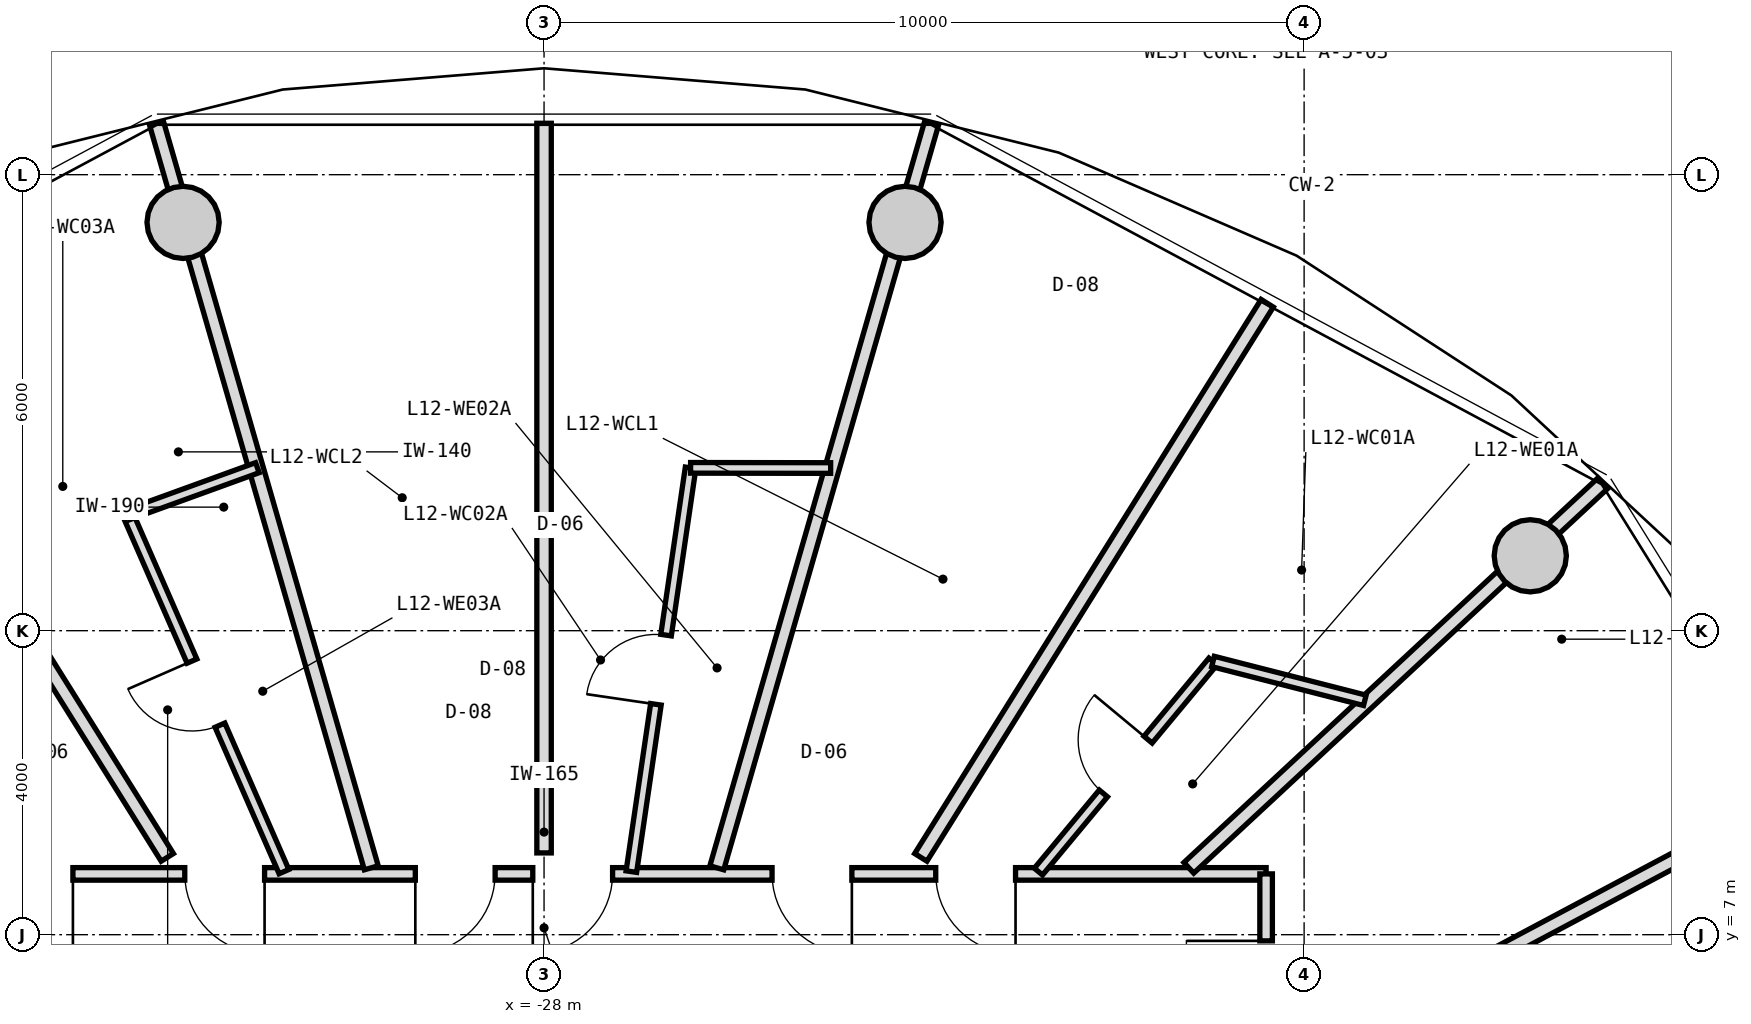
"""IFC4 building model, lengths in metres.
Left out: names, types, materials, properties, quantities, classifications, styles, units other than length and angle.
Written with IfcOpenShell. Run it as: python <this file> out.ifc"""

import sys

from ifc_helpers import new_model, si_unit, direction, frame, frame_2d, origin, origin_2d, place, context, subcontext, project, spatial, rectangle, circle, extrude, source, transform, mapped, element, fill, save


model = new_model("IFC4")
c1 = context("Model", 3, precision=1e-05, world=origin(), true_north=direction((0.0, 1.0)))
c2 = subcontext(c1, "Body", "Model", "MODEL_VIEW")
j1 = project(units=[si_unit("LENGTHUNIT", "METRE"), si_unit("PLANEANGLEUNIT", "RADIAN")], contexts=[c1])
p1 = place(None, origin())
s1 = spatial("IfcSite", under=j1, at=p1, CompositionType="ELEMENT")
p2 = place(p1, origin())
s2 = spatial("IfcBuilding", under=s1, at=p2, CompositionType="ELEMENT")
p3 = place(p2, frame((0.0, 0.0, 42.95)))
s3 = spatial("IfcBuildingStorey", under=s2, at=p3, CompositionType="ELEMENT", Elevation=42.95)
m1 = source(origin(), c2, "Body", "SweptSolid", [
    extrude(circle(Radius=0.475, at=origin_2d()), origin(), (0.0, 0.0, 1.0), 3.05),
])
for number, where, z_axis, x_axis in (
    (1, (-15.025, 11.985, 0.0), (0.0, 0.0, 1.0), (1.0, 0.0, 0.0)),
    (2, (-23.251, 16.373, 0.0), (0.0, 0.0, 1.0), (1.0, 0.0, 0.0)),
    (3, (-32.749, 16.373, 0.0), (0.0, 0.0, 1.0), (1.0, 0.0, 0.0)),
):
    element("IfcColumn", number, at=place(p3, frame(where, z_axis=z_axis, x_axis=x_axis)), inside=s3, PredefinedType="COLUMN", context=c2, shape_type="MappedRepresentation", body=[
        mapped(m1, transform((0.0, 0.0, 0.0), x_axis=(1.0, 0.0, 0.0), y_axis=(0.0, 1.0, 0.0), z_axis=(0.0, 0.0, 1.0), scale=1.0)),
    ])
m2 = source(origin(), c2, "Body", "SweptSolid", [
    extrude(rectangle(XDim=19.0, YDim=0.165, at=frame_2d((9.5, 0.0))), origin(), (0.0, 0.0, 1.0), 2.775),
])
p4 = place(p3, frame((-37.5, 7.8, 0.0), z_axis=(0.0, 0.0, 1.0), x_axis=(1.0, 0.0, 0.0)))
e4 = element("IfcWall", 4, at=p4, inside=s3, PredefinedType="PARTITIONING", context=c2, shape_type="MappedRepresentation", body=[
    mapped(m2, transform((0.0, 0.0, 0.0), x_axis=(1.0, 0.0, 0.0), y_axis=(0.0, 1.0, 0.0), z_axis=(0.0, 0.0, 1.0), scale=1.0)),
])
p5 = place(p4, frame((4.773, 0.0, 0.0)))
e5 = element("IfcOpeningElement", 5, at=p5, cuts=e4, PredefinedType="OPENING", context=c2, shape_type="SweptSolid", body=[
    extrude(rectangle(XDim=1.05, YDim=2.15, at=frame_2d((0.525, 1.075))), frame((0.0, 0.093, 0.0), z_axis=(0.0, -1.0, 0.0), x_axis=(1.0, 0.0, 0.0)), (0.0, 0.0, 1.0), 0.185),
])
p6 = place(p4, frame((2.251, 0.0, 0.0)))
e6 = element("IfcOpeningElement", 6, at=p6, cuts=e4, PredefinedType="OPENING", context=c2, shape_type="SweptSolid", body=[
    extrude(rectangle(XDim=1.05, YDim=2.15, at=frame_2d((0.525, 1.075))), frame((0.0, 0.093, 0.0), z_axis=(0.0, -1.0, 0.0), x_axis=(1.0, 0.0, 0.0)), (0.0, 0.0, 1.0), 0.185),
])
p7 = place(p4, frame((14.653, 0.0, 0.0)))
e7 = element("IfcOpeningElement", 7, at=p7, cuts=e4, PredefinedType="OPENING", context=c2, shape_type="SweptSolid", body=[
    extrude(rectangle(XDim=1.05, YDim=2.15, at=frame_2d((0.525, 1.075))), frame((0.0, 0.093, 0.0), z_axis=(0.0, -1.0, 0.0), x_axis=(1.0, 0.0, 0.0)), (0.0, 0.0, 1.0), 0.185),
])
p8 = place(p4, frame((12.5, 0.0, 0.0)))
e8 = element("IfcOpeningElement", 8, at=p8, cuts=e4, PredefinedType="OPENING", context=c2, shape_type="SweptSolid", body=[
    extrude(rectangle(XDim=1.05, YDim=2.15, at=frame_2d((0.525, 1.075))), frame((0.0, 0.093, 0.0), z_axis=(0.0, -1.0, 0.0), x_axis=(1.0, 0.0, 0.0)), (0.0, 0.0, 1.0), 0.185),
])
p9 = place(p4, frame((9.352, 0.0, 0.0)))
e9 = element("IfcOpeningElement", 9, at=p9, cuts=e4, PredefinedType="OPENING", context=c2, shape_type="SweptSolid", body=[
    extrude(rectangle(XDim=1.05, YDim=2.15, at=frame_2d((0.525, 1.075))), frame((0.0, 0.093, 0.0), z_axis=(0.0, -1.0, 0.0), x_axis=(1.0, 0.0, 0.0)), (0.0, 0.0, 1.0), 0.185),
])
p10 = place(p4, frame((7.806, 0.0, 0.0)))
e10 = element("IfcOpeningElement", 10, at=p10, cuts=e4, PredefinedType="OPENING", context=c2, shape_type="SweptSolid", body=[
    extrude(rectangle(XDim=1.05, YDim=2.15, at=frame_2d((0.525, 1.075))), frame((0.0, 0.093, 0.0), z_axis=(0.0, -1.0, 0.0), x_axis=(1.0, 0.0, 0.0)), (0.0, 0.0, 1.0), 0.185),
])
m3 = source(origin(), c2, "Body", "SweptSolid", [
    extrude(rectangle(XDim=15.6, YDim=0.165, at=frame_2d((7.8, 0.0))), origin(), (0.0, 0.0, 1.0), 2.775),
])
p11 = place(p3, frame((-18.5, 7.8, 0.0), z_axis=(0.0, 0.0, 1.0), x_axis=(0.0, -1.0, 0.0)))
e11 = element("IfcWall", 11, at=p11, inside=s3, PredefinedType="PARTITIONING", context=c2, shape_type="MappedRepresentation", body=[
    mapped(m3, transform((0.0, 0.0, 0.0), x_axis=(1.0, 0.0, 0.0), y_axis=(0.0, 1.0, 0.0), z_axis=(0.0, 0.0, 1.0), scale=1.0)),
])
p12 = place(p11, frame((12.141, 0.0, 0.0)))
e12 = element("IfcOpeningElement", 12, at=p12, cuts=e11, PredefinedType="OPENING", context=c2, shape_type="SweptSolid", body=[
    extrude(rectangle(XDim=1.25, YDim=2.2, at=frame_2d((0.625, 1.1))), frame((0.0, 0.093, 0.0), z_axis=(0.0, -1.0, 0.0), x_axis=(1.0, 0.0, 0.0)), (0.0, 0.0, 1.0), 0.185),
])
p13 = place(p11, frame((7.175, 0.0, 0.0)))
e13 = element("IfcOpeningElement", 13, at=p13, cuts=e11, PredefinedType="OPENING", context=c2, shape_type="SweptSolid", body=[
    extrude(rectangle(XDim=1.25, YDim=2.2, at=frame_2d((0.625, 1.1))), frame((0.0, 0.093, 0.0), z_axis=(0.0, -1.0, 0.0), x_axis=(1.0, 0.0, 0.0)), (0.0, 0.0, 1.0), 0.185),
])
p14 = place(p11, frame((2.826, 0.0, 0.0)))
e14 = element("IfcOpeningElement", 14, at=p14, cuts=e11, PredefinedType="OPENING", context=c2, shape_type="SweptSolid", body=[
    extrude(rectangle(XDim=1.05, YDim=2.15, at=frame_2d((0.525, 1.075))), frame((0.0, 0.093, 0.0), z_axis=(0.0, -1.0, 0.0), x_axis=(1.0, 0.0, 0.0)), (0.0, 0.0, 1.0), 0.185),
])
p15 = place(p11, frame((0.881, 0.0, 0.0)))
e15 = element("IfcOpeningElement", 15, at=p15, cuts=e11, PredefinedType="OPENING", context=c2, shape_type="SweptSolid", body=[
    extrude(rectangle(XDim=1.05, YDim=2.15, at=frame_2d((0.525, 1.075))), frame((0.0, 0.093, 0.0), z_axis=(0.0, -1.0, 0.0), x_axis=(1.0, 0.0, 0.0)), (0.0, 0.0, 1.0), 0.185),
])
m4 = source(origin(), c2, "Body", "SweptSolid", [
    extrude(rectangle(XDim=10.196, YDim=0.19, at=frame_2d((5.098, 0.0))), origin(), (0.0, 0.0, 1.0), 2.225),
])
p16 = place(p3, frame((-30.273, 7.88, 0.0), z_axis=(0.0, 0.0, 1.0), x_axis=(-0.277136420347, 0.960830580549, 0.0)))
e16 = element("IfcWall", 16, at=p16, inside=s3, PredefinedType="PARTITIONING", context=c2, shape_type="MappedRepresentation", body=[
    mapped(m4, transform((0.0, 0.0, 0.0), x_axis=(1.0, 0.0, 0.0), y_axis=(0.0, 1.0, 0.0), z_axis=(0.0, 0.0, 1.0), scale=1.0)),
])
m5 = source(origin(), c2, "Body", "SweptSolid", [
    extrude(rectangle(XDim=8.598, YDim=0.19, at=frame_2d((4.299, 0.0))), origin(), (0.0, 0.0, 1.0), 2.775),
])
p17 = place(p3, frame((-32.957, 8.017, 0.0), z_axis=(0.0, 0.0, 1.0), x_axis=(-0.530039776395, 0.847972779893, 0.0)))
e17 = element("IfcWall", 17, at=p17, inside=s3, PredefinedType="PARTITIONING", context=c2, shape_type="MappedRepresentation", body=[
    mapped(m5, transform((0.0, 0.0, 0.0), x_axis=(1.0, 0.0, 0.0), y_axis=(0.0, 1.0, 0.0), z_axis=(0.0, 0.0, 1.0), scale=1.0)),
])
m6 = source(origin(), c2, "Body", "SweptSolid", [
    extrude(rectangle(XDim=5.126, YDim=0.14, at=frame_2d((2.563, 0.0))), origin(), (0.0, 0.0, 1.0), 2.775),
])
p18 = place(p3, frame((-31.422, 7.83, 0.0), z_axis=(0.0, 0.0, 1.0), x_axis=(-0.400473994842, 0.916308124735, 0.0)))
e18 = element("IfcWall", 18, at=p18, inside=s3, PredefinedType="PARTITIONING", context=c2, shape_type="MappedRepresentation", body=[
    mapped(m6, transform((0.0, 0.0, 0.0), x_axis=(1.0, 0.0, 0.0), y_axis=(0.0, 1.0, 0.0), z_axis=(0.0, 0.0, 1.0), scale=1.0)),
])
p19 = place(p18, frame((2.103, 0.0, 0.0)))
e19 = element("IfcOpeningElement", 19, at=p19, cuts=e18, PredefinedType="OPENING", context=c2, shape_type="SweptSolid", body=[
    extrude(rectangle(XDim=0.92, YDim=2.1, at=frame_2d((0.46, 1.05))), frame((0.0, 0.08, 0.0), z_axis=(0.0, -1.0, 0.0), x_axis=(1.0, 0.0, 0.0)), (0.0, 0.0, 1.0), 0.16),
])
m7 = source(origin(), c2, "Body", "SweptSolid", [
    extrude(rectangle(XDim=1.811, YDim=0.14, at=frame_2d((0.906, 0.0))), origin(), (0.0, 0.0, 1.0), 2.775),
])
p20 = place(p3, frame((-33.475, 12.527, 0.0), z_axis=(0.0, 0.0, 1.0), x_axis=(0.940009682452, 0.341147764021, 0.0)))
e20 = element("IfcWall", 20, at=p20, inside=s3, PredefinedType="PARTITIONING", context=c2, shape_type="MappedRepresentation", body=[
    mapped(m7, transform((0.0, 0.0, 0.0), x_axis=(1.0, 0.0, 0.0), y_axis=(0.0, 1.0, 0.0), z_axis=(0.0, 0.0, 1.0), scale=1.0)),
])
m8 = source(origin(), c2, "Body", "SweptSolid", [
    extrude(rectangle(XDim=7.435, YDim=0.19, at=frame_2d((3.717, 0.0))), origin(), (0.0, 0.0, 1.0), 2.225),
])
p21 = place(p3, frame((-19.517, 7.88, 0.0), z_axis=(0.0, 0.0, 1.0), x_axis=(0.732651956848, 0.680603489652, 0.0)))
e21 = element("IfcWall", 21, at=p21, inside=s3, PredefinedType="PARTITIONING", context=c2, shape_type="MappedRepresentation", body=[
    mapped(m8, transform((0.0, 0.0, 0.0), x_axis=(1.0, 0.0, 0.0), y_axis=(0.0, 1.0, 0.0), z_axis=(0.0, 0.0, 1.0), scale=1.0)),
])
m9 = source(origin(), c2, "Body", "SweptSolid", [
    extrude(rectangle(XDim=7.677, YDim=0.19, at=frame_2d((3.838, 0.0))), origin(), (0.0, 0.0, 1.0), 2.775),
])
p22 = place(p3, frame((-18.297, 5.231, 0.0), z_axis=(0.0, 0.0, 1.0), x_axis=(0.882725057546, 0.469889851753, 0.0)))
e22 = element("IfcWall", 22, at=p22, inside=s3, PredefinedType="PARTITIONING", context=c2, shape_type="MappedRepresentation", body=[
    mapped(m9, transform((0.0, 0.0, 0.0), x_axis=(1.0, 0.0, 0.0), y_axis=(0.0, 1.0, 0.0), z_axis=(0.0, 0.0, 1.0), scale=1.0)),
])
p23 = place(p3, frame((-25.727, 7.88, 0.0), z_axis=(0.0, 0.0, 1.0), x_axis=(0.277136420347, 0.960830580549, 0.0)))
e23 = element("IfcWall", 23, at=p23, inside=s3, PredefinedType="PARTITIONING", context=c2, shape_type="MappedRepresentation", body=[
    mapped(m4, transform((0.0, 0.0, 0.0), x_axis=(1.0, 0.0, 0.0), y_axis=(0.0, 1.0, 0.0), z_axis=(0.0, 0.0, 1.0), scale=1.0)),
])
p24 = place(p3, frame((-23.043, 8.017, 0.0), z_axis=(0.0, 0.0, 1.0), x_axis=(0.530039776395, 0.847972779893, 0.0)))
e24 = element("IfcWall", 24, at=p24, inside=s3, PredefinedType="PARTITIONING", context=c2, shape_type="MappedRepresentation", body=[
    mapped(m5, transform((0.0, 0.0, 0.0), x_axis=(1.0, 0.0, 0.0), y_axis=(0.0, 1.0, 0.0), z_axis=(0.0, 0.0, 1.0), scale=1.0)),
])
m10 = source(origin(), c2, "Body", "SweptSolid", [
    extrude(rectangle(XDim=3.594, YDim=0.14, at=frame_2d((1.797, 0.0))), origin(), (0.0, 0.0, 1.0), 2.775),
])
p25 = place(p3, frame((-21.496, 7.83, 0.0), z_axis=(0.0, 0.0, 1.0), x_axis=(0.639001147083, 0.769205781326, 0.0)))
e25 = element("IfcWall", 25, at=p25, inside=s3, PredefinedType="PARTITIONING", context=c2, shape_type="MappedRepresentation", body=[
    mapped(m10, transform((0.0, 0.0, 0.0), x_axis=(1.0, 0.0, 0.0), y_axis=(0.0, 1.0, 0.0), z_axis=(0.0, 0.0, 1.0), scale=1.0)),
])
p26 = place(p25, frame((1.337, 0.0, 0.0)))
e26 = element("IfcOpeningElement", 26, at=p26, cuts=e25, PredefinedType="OPENING", context=c2, shape_type="SweptSolid", body=[
    extrude(rectangle(XDim=0.92, YDim=2.1, at=frame_2d((0.46, 1.05))), frame((0.0, 0.08, 0.0), z_axis=(0.0, -1.0, 0.0), x_axis=(1.0, 0.0, 0.0)), (0.0, 0.0, 1.0), 0.16),
])
m11 = source(origin(), c2, "Body", "SweptSolid", [
    extrude(rectangle(XDim=2.062, YDim=0.14, at=frame_2d((1.031, 0.0))), origin(), (0.0, 0.0, 1.0), 2.415),
])
p27 = place(p3, frame((-19.199, 10.595, 0.0), z_axis=(0.0, 0.0, 1.0), x_axis=(0.968776253543, -0.247936626121, 0.0)))
e27 = element("IfcWall", 27, at=p27, inside=s3, PredefinedType="PARTITIONING", context=c2, shape_type="MappedRepresentation", body=[
    mapped(m11, transform((0.0, 0.0, 0.0), x_axis=(1.0, 0.0, 0.0), y_axis=(0.0, 1.0, 0.0), z_axis=(0.0, 0.0, 1.0), scale=1.0)),
])
m12 = source(origin(), c2, "Body", "SweptSolid", [
    extrude(rectangle(XDim=9.601, YDim=0.19, at=frame_2d((4.8, 0.0))), origin(), (0.0, 0.0, 1.0), 2.775),
])
p28 = place(p3, frame((-28.0, 8.076, 0.0), z_axis=(0.0, 0.0, 1.0), x_axis=(0.0, 1.0, 0.0)))
e28 = element("IfcWall", 28, at=p28, inside=s3, PredefinedType="PARTITIONING", context=c2, shape_type="MappedRepresentation", body=[
    mapped(m12, transform((0.0, 0.0, 0.0), x_axis=(1.0, 0.0, 0.0), y_axis=(0.0, 1.0, 0.0), z_axis=(0.0, 0.0, 1.0), scale=1.0)),
])
m13 = source(origin(), c2, "Body", "SweptSolid", [
    extrude(rectangle(XDim=5.37, YDim=0.14, at=frame_2d((2.685, 0.0))), origin(), (0.0, 0.0, 1.0), 2.775),
])
p29 = place(p3, frame((-26.851, 7.83, 0.0), z_axis=(0.0, 0.0, 1.0), x_axis=(0.145131397853, 0.989412389935, 0.0)))
e29 = element("IfcWall", 29, at=p29, inside=s3, PredefinedType="PARTITIONING", context=c2, shape_type="MappedRepresentation", body=[
    mapped(m13, transform((0.0, 0.0, 0.0), x_axis=(1.0, 0.0, 0.0), y_axis=(0.0, 1.0, 0.0), z_axis=(0.0, 0.0, 1.0), scale=1.0)),
])
p30 = place(p29, frame((2.225, 0.0, 0.0)))
e30 = element("IfcOpeningElement", 30, at=p30, cuts=e29, PredefinedType="OPENING", context=c2, shape_type="SweptSolid", body=[
    extrude(rectangle(XDim=0.92, YDim=2.1, at=frame_2d((0.46, 1.05))), frame((0.0, 0.08, 0.0), z_axis=(0.0, -1.0, 0.0), x_axis=(1.0, 0.0, 0.0)), (0.0, 0.0, 1.0), 0.16),
])
m14 = source(origin(), c2, "Body", "SweptSolid", [
    extrude(rectangle(XDim=1.843, YDim=0.14, at=frame_2d((0.921, 0.0))), origin(), (0.0, 0.0, 1.0), 2.775),
])
p31 = place(p3, frame((-26.072, 13.143, 0.0), z_axis=(0.0, 0.0, 1.0), x_axis=(0.999998937801, -0.001457531246, 0.0)))
e31 = element("IfcWall", 31, at=p31, inside=s3, PredefinedType="PARTITIONING", context=c2, shape_type="MappedRepresentation", body=[
    mapped(m14, transform((0.0, 0.0, 0.0), x_axis=(1.0, 0.0, 0.0), y_axis=(0.0, 1.0, 0.0), z_axis=(0.0, 0.0, 1.0), scale=1.0)),
])
m15 = source(origin(), c2, "Body", "SweptSolid", [
    extrude(rectangle(XDim=1.05, YDim=2.15, at=frame_2d((0.525, 1.075))), frame((0.0, 0.025, 0.0), z_axis=(0.0, -1.0, 0.0), x_axis=(1.0, 0.0, 0.0)), (0.0, 0.0, 1.0), 0.05),
])
p32 = place(p5, frame((1.05, 0.0, 0.0), z_axis=(0.0, 0.0, 1.0), x_axis=(-1.0, 0.0, 0.0)))
e32 = element("IfcDoor", 32, at=p32, inside=s3, OperationType="SINGLE_SWING_LEFT", PredefinedType="DOOR", context=c2, shape_type="MappedRepresentation", body=[
    mapped(m15, transform((0.0, 0.0, 0.0), x_axis=(1.0, 0.0, 0.0), y_axis=(0.0, 1.0, 0.0), z_axis=(0.0, 0.0, 1.0), scale=1.0)),
])
fill(e5, e32)
m16 = source(origin(), c2, "Body", "SweptSolid", [
    extrude(rectangle(XDim=0.92, YDim=2.1, at=frame_2d((0.46, 1.05))), frame((0.0, 0.025, 0.0), z_axis=(0.0, -1.0, 0.0), x_axis=(1.0, 0.0, 0.0)), (0.0, 0.0, 1.0), 0.05),
])
p33 = place(p19, origin())
e33 = element("IfcDoor", 33, at=p33, inside=s3, OperationType="SINGLE_SWING_RIGHT", PredefinedType="DOOR", context=c2, shape_type="MappedRepresentation", body=[
    mapped(m16, transform((0.0, 0.0, 0.0), x_axis=(1.0, 0.0, 0.0), y_axis=(0.0, 1.0, 0.0), z_axis=(0.0, 0.0, 1.0), scale=1.0)),
])
fill(e19, e33)
p34 = place(p6, frame((1.05, 0.0, 0.0), z_axis=(0.0, 0.0, 1.0), x_axis=(-1.0, 0.0, 0.0)))
e34 = element("IfcDoor", 34, at=p34, inside=s3, OperationType="SINGLE_SWING_LEFT", PredefinedType="DOOR", context=c2, shape_type="MappedRepresentation", body=[
    mapped(m15, transform((0.0, 0.0, 0.0), x_axis=(1.0, 0.0, 0.0), y_axis=(0.0, 1.0, 0.0), z_axis=(0.0, 0.0, 1.0), scale=1.0)),
])
fill(e6, e34)
p35 = place(p15, frame((1.05, 0.0, 0.0), z_axis=(0.0, 0.0, 1.0), x_axis=(-1.0, 0.0, 0.0)))
e35 = element("IfcDoor", 35, at=p35, inside=s3, OperationType="SINGLE_SWING_RIGHT", PredefinedType="DOOR", context=c2, shape_type="MappedRepresentation", body=[
    mapped(m15, transform((0.0, 0.0, 0.0), x_axis=(1.0, 0.0, 0.0), y_axis=(0.0, 1.0, 0.0), z_axis=(0.0, 0.0, 1.0), scale=1.0)),
])
fill(e15, e35)
p36 = place(p7, frame((1.05, 0.0, 0.0), z_axis=(0.0, 0.0, 1.0), x_axis=(-1.0, 0.0, 0.0)))
e36 = element("IfcDoor", 36, at=p36, inside=s3, OperationType="SINGLE_SWING_LEFT", PredefinedType="DOOR", context=c2, shape_type="MappedRepresentation", body=[
    mapped(m15, transform((0.0, 0.0, 0.0), x_axis=(1.0, 0.0, 0.0), y_axis=(0.0, 1.0, 0.0), z_axis=(0.0, 0.0, 1.0), scale=1.0)),
])
fill(e7, e36)
p37 = place(p26, origin())
e37 = element("IfcDoor", 37, at=p37, inside=s3, OperationType="SINGLE_SWING_RIGHT", PredefinedType="DOOR", context=c2, shape_type="MappedRepresentation", body=[
    mapped(m16, transform((0.0, 0.0, 0.0), x_axis=(1.0, 0.0, 0.0), y_axis=(0.0, 1.0, 0.0), z_axis=(0.0, 0.0, 1.0), scale=1.0)),
])
fill(e26, e37)
p38 = place(p8, frame((1.05, 0.0, 0.0), z_axis=(0.0, 0.0, 1.0), x_axis=(-1.0, 0.0, 0.0)))
e38 = element("IfcDoor", 38, at=p38, inside=s3, OperationType="SINGLE_SWING_LEFT", PredefinedType="DOOR", context=c2, shape_type="MappedRepresentation", body=[
    mapped(m15, transform((0.0, 0.0, 0.0), x_axis=(1.0, 0.0, 0.0), y_axis=(0.0, 1.0, 0.0), z_axis=(0.0, 0.0, 1.0), scale=1.0)),
])
fill(e8, e38)
p39 = place(p9, frame((1.05, 0.0, 0.0), z_axis=(0.0, 0.0, 1.0), x_axis=(-1.0, 0.0, 0.0)))
e39 = element("IfcDoor", 39, at=p39, inside=s3, OperationType="SINGLE_SWING_RIGHT", PredefinedType="DOOR", context=c2, shape_type="MappedRepresentation", body=[
    mapped(m15, transform((0.0, 0.0, 0.0), x_axis=(1.0, 0.0, 0.0), y_axis=(0.0, 1.0, 0.0), z_axis=(0.0, 0.0, 1.0), scale=1.0)),
])
fill(e9, e39)
p40 = place(p30, origin())
e40 = element("IfcDoor", 40, at=p40, inside=s3, OperationType="SINGLE_SWING_LEFT", PredefinedType="DOOR", context=c2, shape_type="MappedRepresentation", body=[
    mapped(m16, transform((0.0, 0.0, 0.0), x_axis=(1.0, 0.0, 0.0), y_axis=(0.0, 1.0, 0.0), z_axis=(0.0, 0.0, 1.0), scale=1.0)),
])
fill(e30, e40)
p41 = place(p10, frame((1.05, 0.0, 0.0), z_axis=(0.0, 0.0, 1.0), x_axis=(-1.0, 0.0, 0.0)))
e41 = element("IfcDoor", 41, at=p41, inside=s3, OperationType="SINGLE_SWING_RIGHT", PredefinedType="DOOR", context=c2, shape_type="MappedRepresentation", body=[
    mapped(m15, transform((0.0, 0.0, 0.0), x_axis=(1.0, 0.0, 0.0), y_axis=(0.0, 1.0, 0.0), z_axis=(0.0, 0.0, 1.0), scale=1.0)),
])
fill(e10, e41)
save(model, sys.argv[1])
